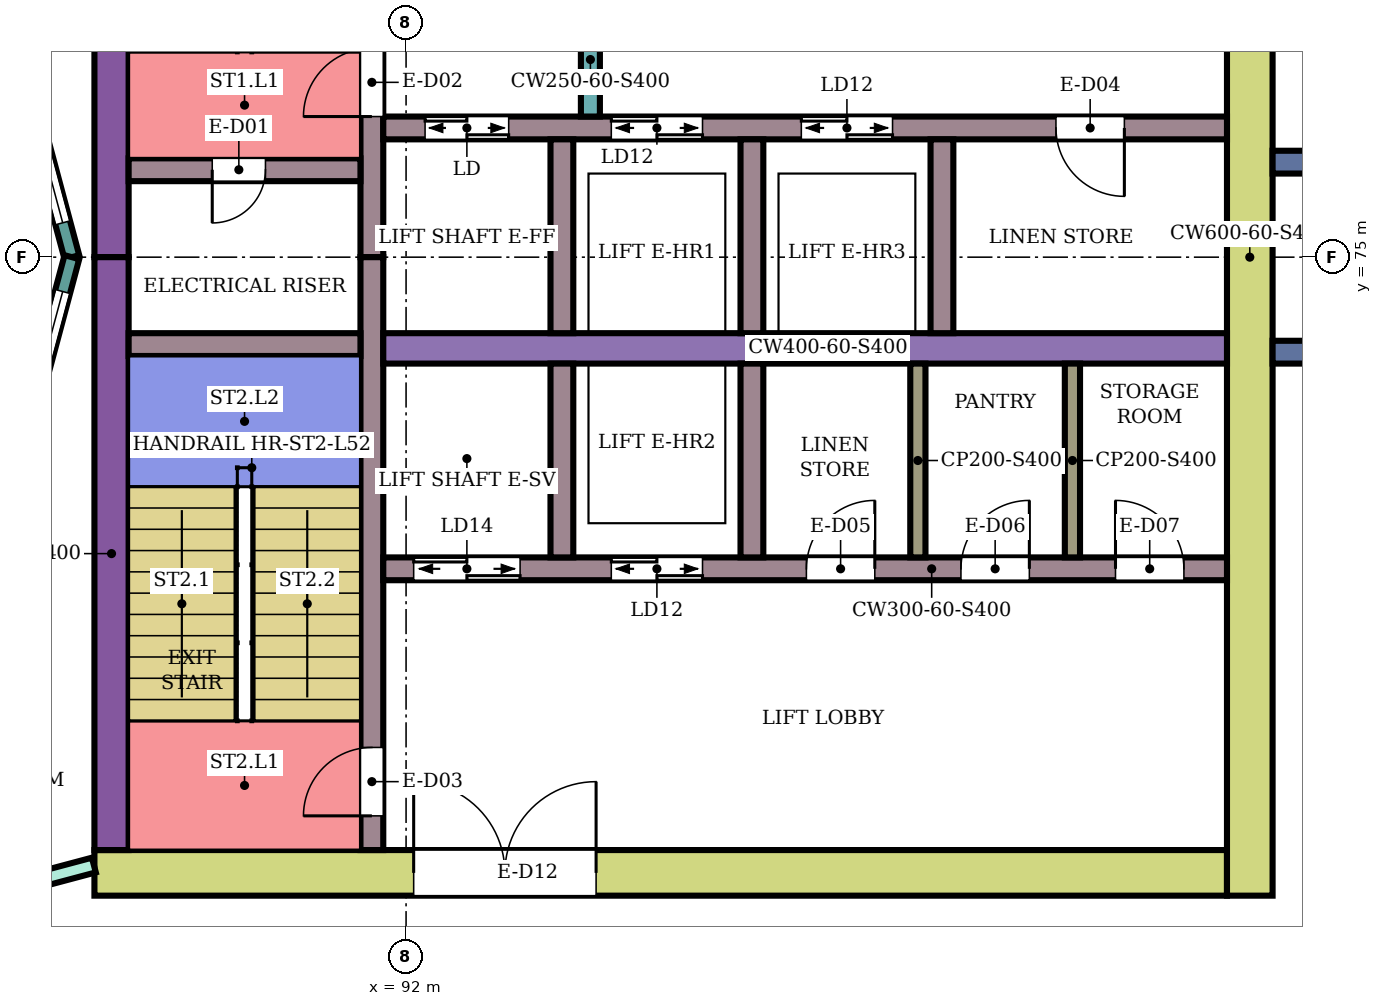
"""IFC4 building model, lengths in metres.
Left out: names, types, materials, properties, quantities, classifications, styles, units other than length and angle.
Written with IfcOpenShell. Run it as: python <this file> out.ifc"""

import sys

from ifc_helpers import new_model, si_unit, direction, frame, frame_2d, origin, place, context, subcontext, project, spatial, rectangle, extrude, element, fill, save


model = new_model("IFC4")
c1 = context("Model", 3, precision=1e-05, world=origin(), true_north=direction((0.0, 1.0)))
c2 = subcontext(c1, "Body", "Model", "MODEL_VIEW")
j1 = project(units=[si_unit("LENGTHUNIT", "METRE"), si_unit("PLANEANGLEUNIT", "RADIAN")], contexts=[c1])
p1 = place(None, origin())
s1 = spatial("IfcSite", under=j1, at=p1, CompositionType="ELEMENT")
p2 = place(p1, origin())
s2 = spatial("IfcBuilding", under=s1, at=p2, CompositionType="ELEMENT")
p3 = place(p2, frame((0.0, 0.0, 225.1)))
s3 = spatial("IfcBuildingStorey", under=s2, at=p3, CompositionType="ELEMENT", Elevation=225.1)
p4 = place(p3, frame((87.9, 66.9, 0.0), z_axis=(0.0, 0.0, 1.0), x_axis=(1.0, 0.0, 0.0)))
e1 = element("IfcWall", 1, at=p4, inside=s3, PredefinedType="SHEAR", context=c2, shape_type="SweptSolid", body=[
    extrude(rectangle(XDim=14.9, YDim=0.6, at=frame_2d((7.45, 0.0))), origin(), (0.0, 0.0, 1.0), 3.8),
])
p5 = place(p4, frame((4.2, 0.0, 0.0)))
e2 = element("IfcOpeningElement", 2, at=p5, cuts=e1, PredefinedType="OPENING", context=c2, shape_type="SweptSolid", body=[
    extrude(rectangle(XDim=2.4, YDim=2.4, at=frame_2d((1.2, 1.2))), frame((0.0, 0.31, 0.0), z_axis=(0.0, -1.0, 0.0), x_axis=(1.0, 0.0, 0.0)), (0.0, 0.0, 1.0), 0.62),
])
for number, where, z_axis, x_axis in (
    (3, (88.125, 75.0, 0.0), (0.0, 0.0, 1.0), (0.0, 1.0, 0.0)),
    (4, (88.125, 67.2, 0.0), (0.0, 0.0, 1.0), (0.0, 1.0, 0.0)),
):
    element("IfcWall", number, at=place(p3, frame(where, z_axis=z_axis, x_axis=x_axis)), inside=s3, PredefinedType="SHEAR", context=c2, shape_type="SweptSolid", body=[
        extrude(rectangle(XDim=7.8, YDim=0.45, at=frame_2d((3.9, 0.0))), origin(), (0.0, 0.0, 1.0), 3.8),
    ])
p6 = place(p3, frame((103.1, 66.6, 0.0), z_axis=(0.0, 0.0, 1.0), x_axis=(0.0, 1.0, 0.0)))
e5 = element("IfcWall", 5, at=p6, inside=s3, PredefinedType="SHEAR", context=c2, shape_type="SweptSolid", body=[
    extrude(rectangle(XDim=16.8, YDim=0.6, at=frame_2d((8.4, 0.0))), origin(), (0.0, 0.0, 1.0), 3.8),
])
p7 = place(p3, frame((91.55, 75.0, 0.0), z_axis=(0.0, 0.0, 1.0), x_axis=(0.0, 1.0, 0.0)))
e6 = element("IfcWall", 6, at=p7, inside=s3, PredefinedType="SHEAR", context=c2, shape_type="SweptSolid", body=[
    extrude(rectangle(XDim=7.8, YDim=0.3, at=frame_2d((3.9, 0.0))), origin(), (0.0, 0.0, 1.0), 3.8),
])
p8 = place(p7, frame((1.85, 0.0, 0.0)))
e7 = element("IfcOpeningElement", 7, at=p8, cuts=e6, PredefinedType="OPENING", context=c2, shape_type="SweptSolid", body=[
    extrude(rectangle(XDim=0.9, YDim=2.1, at=frame_2d((0.45, 1.05))), frame((0.0, 0.16, 0.0), z_axis=(0.0, -1.0, 0.0), x_axis=(1.0, 0.0, 0.0)), (0.0, 0.0, 1.0), 0.32),
])
p9 = place(p3, frame((91.55, 67.2, 0.0), z_axis=(0.0, 0.0, 1.0), x_axis=(0.0, 1.0, 0.0)))
e8 = element("IfcWall", 8, at=p9, inside=s3, PredefinedType="SHEAR", context=c2, shape_type="SweptSolid", body=[
    extrude(rectangle(XDim=7.8, YDim=0.3, at=frame_2d((3.9, 0.0))), origin(), (0.0, 0.0, 1.0), 3.8),
])
p10 = place(p9, frame((0.45, 0.0, 0.0)))
e9 = element("IfcOpeningElement", 9, at=p10, cuts=e8, PredefinedType="OPENING", context=c2, shape_type="SweptSolid", body=[
    extrude(rectangle(XDim=0.9, YDim=2.1, at=frame_2d((0.45, 1.05))), frame((0.0, 0.16, 0.0), z_axis=(0.0, -1.0, 0.0), x_axis=(1.0, 0.0, 0.0)), (0.0, 0.0, 1.0), 0.32),
])
p11 = place(p3, frame((88.35, 76.15, 0.0), z_axis=(0.0, 0.0, 1.0), x_axis=(1.0, 0.0, 0.0)))
e10 = element("IfcWall", 10, at=p11, inside=s3, PredefinedType="SHEAR", context=c2, shape_type="SweptSolid", body=[
    extrude(rectangle(XDim=3.05, YDim=0.3, at=frame_2d((1.525, 0.0))), origin(), (0.0, 0.0, 1.0), 3.8),
])
p12 = place(p11, frame((1.1, 0.0, 0.0)))
e11 = element("IfcOpeningElement", 11, at=p12, cuts=e10, PredefinedType="OPENING", context=c2, shape_type="SweptSolid", body=[
    extrude(rectangle(XDim=0.7, YDim=2.0, at=frame_2d((0.35, 1.0))), frame((0.0, 0.16, 0.0), z_axis=(0.0, -1.0, 0.0), x_axis=(1.0, 0.0, 0.0)), (0.0, 0.0, 1.0), 0.32),
])
p13 = place(p3, frame((88.35, 73.85, 0.0), z_axis=(0.0, 0.0, 1.0), x_axis=(1.0, 0.0, 0.0)))
e12 = element("IfcWall", 12, at=p13, inside=s3, PredefinedType="SHEAR", context=c2, shape_type="SweptSolid", body=[
    extrude(rectangle(XDim=3.05, YDim=0.3, at=frame_2d((1.525, 0.0))), origin(), (0.0, 0.0, 1.0), 3.8),
])
p14 = place(p3, frame((91.7, 76.7, 0.0), z_axis=(0.0, 0.0, 1.0), x_axis=(1.0, 0.0, 0.0)))
e13 = element("IfcWall", 13, at=p14, inside=s3, PredefinedType="SHEAR", context=c2, shape_type="SweptSolid", body=[
    extrude(rectangle(XDim=11.1, YDim=0.3, at=frame_2d((5.55, 0.0))), origin(), (0.0, 0.0, 1.0), 3.8),
])
p15 = place(p14, frame((0.55, 0.0, 0.0)))
e14 = element("IfcOpeningElement", 14, at=p15, cuts=e13, PredefinedType="OPENING", context=c2, shape_type="SweptSolid", body=[
    extrude(rectangle(XDim=1.1, YDim=2.1, at=frame_2d((0.55, 1.05))), frame((0.0, 0.16, 0.0), z_axis=(0.0, -1.0, 0.0), x_axis=(1.0, 0.0, 0.0)), (0.0, 0.0, 1.0), 0.32),
])
p16 = place(p14, frame((3.0, 0.0, 0.0)))
e15 = element("IfcOpeningElement", 15, at=p16, cuts=e13, PredefinedType="OPENING", context=c2, shape_type="SweptSolid", body=[
    extrude(rectangle(XDim=1.2, YDim=2.1, at=frame_2d((0.6, 1.05))), frame((0.0, 0.16, 0.0), z_axis=(0.0, -1.0, 0.0), x_axis=(1.0, 0.0, 0.0)), (0.0, 0.0, 1.0), 0.32),
])
p17 = place(p14, frame((5.5, 0.0, 0.0)))
e16 = element("IfcOpeningElement", 16, at=p17, cuts=e13, PredefinedType="OPENING", context=c2, shape_type="SweptSolid", body=[
    extrude(rectangle(XDim=1.2, YDim=2.1, at=frame_2d((0.6, 1.05))), frame((0.0, 0.16, 0.0), z_axis=(0.0, -1.0, 0.0), x_axis=(1.0, 0.0, 0.0)), (0.0, 0.0, 1.0), 0.32),
])
p18 = place(p14, frame((8.85, 0.0, 0.0)))
e17 = element("IfcOpeningElement", 17, at=p18, cuts=e13, PredefinedType="OPENING", context=c2, shape_type="SweptSolid", body=[
    extrude(rectangle(XDim=0.9, YDim=2.1, at=frame_2d((0.45, 1.05))), frame((0.0, 0.16, 0.0), z_axis=(0.0, -1.0, 0.0), x_axis=(1.0, 0.0, 0.0)), (0.0, 0.0, 1.0), 0.32),
])
p19 = place(p3, frame((91.7, 73.8, 0.0), z_axis=(0.0, 0.0, 1.0), x_axis=(1.0, 0.0, 0.0)))
e18 = element("IfcWall", 18, at=p19, inside=s3, PredefinedType="SHEAR", context=c2, shape_type="SweptSolid", body=[
    extrude(rectangle(XDim=11.1, YDim=0.4, at=frame_2d((5.55, 0.0))), origin(), (0.0, 0.0, 1.0), 3.8),
])
p20 = place(p3, frame((91.7, 70.9, 0.0), z_axis=(0.0, 0.0, 1.0), x_axis=(1.0, 0.0, 0.0)))
e19 = element("IfcWall", 19, at=p20, inside=s3, PredefinedType="SHEAR", context=c2, shape_type="SweptSolid", body=[
    extrude(rectangle(XDim=11.1, YDim=0.3, at=frame_2d((5.55, 0.0))), origin(), (0.0, 0.0, 1.0), 3.8),
])
p21 = place(p20, frame((0.4, 0.0, 0.0)))
e20 = element("IfcOpeningElement", 20, at=p21, cuts=e19, PredefinedType="OPENING", context=c2, shape_type="SweptSolid", body=[
    extrude(rectangle(XDim=1.4, YDim=2.1, at=frame_2d((0.7, 1.05))), frame((0.0, 0.16, 0.0), z_axis=(0.0, -1.0, 0.0), x_axis=(1.0, 0.0, 0.0)), (0.0, 0.0, 1.0), 0.32),
])
p22 = place(p20, frame((3.0, 0.0, 0.0)))
e21 = element("IfcOpeningElement", 21, at=p22, cuts=e19, PredefinedType="OPENING", context=c2, shape_type="SweptSolid", body=[
    extrude(rectangle(XDim=1.2, YDim=2.1, at=frame_2d((0.6, 1.05))), frame((0.0, 0.16, 0.0), z_axis=(0.0, -1.0, 0.0), x_axis=(1.0, 0.0, 0.0)), (0.0, 0.0, 1.0), 0.32),
])
p23 = place(p20, frame((5.567, 0.0, 0.0)))
e22 = element("IfcOpeningElement", 22, at=p23, cuts=e19, PredefinedType="OPENING", context=c2, shape_type="SweptSolid", body=[
    extrude(rectangle(XDim=0.9, YDim=2.1, at=frame_2d((0.45, 1.05))), frame((0.0, 0.16, 0.0), z_axis=(0.0, -1.0, 0.0), x_axis=(1.0, 0.0, 0.0)), (0.0, 0.0, 1.0), 0.32),
])
p24 = place(p20, frame((7.6, 0.0, 0.0)))
e23 = element("IfcOpeningElement", 23, at=p24, cuts=e19, PredefinedType="OPENING", context=c2, shape_type="SweptSolid", body=[
    extrude(rectangle(XDim=0.9, YDim=2.1, at=frame_2d((0.45, 1.05))), frame((0.0, 0.16, 0.0), z_axis=(0.0, -1.0, 0.0), x_axis=(1.0, 0.0, 0.0)), (0.0, 0.0, 1.0), 0.32),
])
p25 = place(p20, frame((9.633, 0.0, 0.0)))
e24 = element("IfcOpeningElement", 24, at=p25, cuts=e19, PredefinedType="OPENING", context=c2, shape_type="SweptSolid", body=[
    extrude(rectangle(XDim=0.9, YDim=2.1, at=frame_2d((0.45, 1.05))), frame((0.0, 0.16, 0.0), z_axis=(0.0, -1.0, 0.0), x_axis=(1.0, 0.0, 0.0)), (0.0, 0.0, 1.0), 0.32),
])
for number, where, z_axis, x_axis in (
    (25, (94.05, 74.0, 0.0), (0.0, 0.0, 1.0), (0.0, 1.0, 0.0)),
    (26, (96.55, 74.0, 0.0), (0.0, 0.0, 1.0), (0.0, 1.0, 0.0)),
    (27, (99.05, 74.0, 0.0), (0.0, 0.0, 1.0), (0.0, 1.0, 0.0)),
    (28, (94.05, 71.05, 0.0), (0.0, 0.0, 1.0), (0.0, 1.0, 0.0)),
    (29, (96.55, 71.05, 0.0), (0.0, 0.0, 1.0), (0.0, 1.0, 0.0)),
):
    element("IfcWall", number, at=place(p3, frame(where, z_axis=z_axis, x_axis=x_axis)), inside=s3, PredefinedType="SHEAR", context=c2, shape_type="SweptSolid", body=[
        extrude(rectangle(XDim=2.55, YDim=0.3, at=frame_2d((1.275, 0.0))), origin(), (0.0, 0.0, 1.0), 3.8),
    ])
p26 = place(p3, frame((94.425, 76.85, 0.0), z_axis=(0.0, 0.0, 1.0), x_axis=(0.0, 1.0, 0.0)))
e30 = element("IfcWall", 30, at=p26, inside=s3, PredefinedType="SHEAR", context=c2, shape_type="SweptSolid", body=[
    extrude(rectangle(XDim=1.5, YDim=0.25, at=frame_2d((0.75, 0.0))), origin(), (0.0, 0.0, 1.0), 3.8),
])
for number, where, z_axis, x_axis in (
    (31, (103.4, 73.75, 0.0), (0.0, 0.0, 1.0), (1.0, 0.0, 0.0)),
    (32, (103.4, 76.25, 0.0), (0.0, 0.0, 1.0), (1.0, 0.0, 0.0)),
):
    element("IfcWall", number, at=place(p3, frame(where, z_axis=z_axis, x_axis=x_axis)), inside=s3, PredefinedType="NOTDEFINED", context=c2, shape_type="SweptSolid", body=[
        extrude(rectangle(XDim=2.416, YDim=0.3, at=frame_2d((1.208, 0.0))), origin(), (0.0, 0.0, 1.0), 4.2),
    ])
p27 = place(p3, frame((87.604, 75.0, 0.0), z_axis=(0.0, 0.0, 1.0), x_axis=(-0.258789828301, 0.965933654434, 0.0)))
e33 = element("IfcWall", 33, at=p27, inside=s3, PredefinedType="NOTDEFINED", context=c2, shape_type="SweptSolid", body=[
    extrude(rectangle(XDim=3.936, YDim=0.2, at=frame_2d((1.968, 0.0))), origin(), (0.0, 0.0, 1.0), 4.2),
])
p28 = place(p27, frame((0.468, 0.0, 0.9)))
e34 = element("IfcOpeningElement", 34, at=p28, cuts=e33, PredefinedType="OPENING", context=c2, shape_type="SweptSolid", body=[
    extrude(rectangle(XDim=3.0, YDim=2.3, at=frame_2d((1.5, 1.15))), frame((0.0, 0.11, 0.0), z_axis=(0.0, -1.0, 0.0), x_axis=(1.0, 0.0, 0.0)), (0.0, 0.0, 1.0), 0.22),
])
p29 = place(p3, frame((86.585, 71.198, 0.0), z_axis=(0.0, 0.0, 1.0), x_axis=(0.258789828301, 0.965933654434, 0.0)))
e35 = element("IfcWall", 35, at=p29, inside=s3, PredefinedType="NOTDEFINED", context=c2, shape_type="SweptSolid", body=[
    extrude(rectangle(XDim=3.936, YDim=0.2, at=frame_2d((1.968, 0.0))), origin(), (0.0, 0.0, 1.0), 4.2),
])
p30 = place(p29, frame((0.468, 0.0, 0.9)))
e36 = element("IfcOpeningElement", 36, at=p30, cuts=e35, PredefinedType="OPENING", context=c2, shape_type="SweptSolid", body=[
    extrude(rectangle(XDim=3.0, YDim=2.3, at=frame_2d((1.5, 1.15))), frame((0.0, 0.11, 0.0), z_axis=(0.0, -1.0, 0.0), x_axis=(1.0, 0.0, 0.0)), (0.0, 0.0, 1.0), 0.22),
])
p31 = place(p3, frame((80.125, 64.932, 0.0), z_axis=(0.0, 0.0, 1.0), x_axis=(0.966236955806, 0.257655089674, 0.0)))
e37 = element("IfcWall", 37, at=p31, inside=s3, PredefinedType="PARTITIONING", context=c2, shape_type="SweptSolid", body=[
    extrude(rectangle(XDim=8.039, YDim=0.2, at=frame_2d((4.02, 0.0))), origin(), (0.0, 0.0, 1.0), 3.75),
])
p32 = place(p31, frame((6.298, 0.0, 0.0)))
e38 = element("IfcOpeningElement", 38, at=p32, cuts=e37, PredefinedType="OPENING", context=c2, shape_type="SweptSolid", body=[
    extrude(rectangle(XDim=0.9, YDim=2.1, at=frame_2d((0.45, 1.05))), frame((0.0, 0.11, 0.0), z_axis=(0.0, -1.0, 0.0), x_axis=(1.0, 0.0, 0.0)), (0.0, 0.0, 1.0), 0.22),
])
p33 = place(p31, frame((2.045, 0.0, 0.0)))
e39 = element("IfcOpeningElement", 39, at=p33, cuts=e37, PredefinedType="OPENING", context=c2, shape_type="SweptSolid", body=[
    extrude(rectangle(XDim=0.9, YDim=2.1, at=frame_2d((0.45, 1.05))), frame((0.0, 0.11, 0.0), z_axis=(0.0, -1.0, 0.0), x_axis=(1.0, 0.0, 0.0)), (0.0, 0.0, 1.0), 0.22),
])
for number, where, z_axis, x_axis in (
    (40, (98.733, 71.05, 0.0), (0.0, 0.0, 1.0), (0.0, 1.0, 0.0)),
    (41, (100.767, 71.05, 0.0), (0.0, 0.0, 1.0), (0.0, 1.0, 0.0)),
):
    element("IfcWall", number, at=place(p3, frame(where, z_axis=z_axis, x_axis=x_axis)), inside=s3, PredefinedType="PARTITIONING", context=c2, shape_type="SweptSolid", body=[
        extrude(rectangle(XDim=2.55, YDim=0.2, at=frame_2d((1.275, 0.0))), origin(), (0.0, 0.0, 1.0), 3.8),
    ])
p34 = place(p28, origin())
e42 = element("IfcWindow", 42, at=p34, inside=s3, PartitioningType="SINGLE_PANEL", PredefinedType="WINDOW", context=c2, shape_type="SweptSolid", body=[
    extrude(rectangle(XDim=3.0, YDim=2.3, at=frame_2d((1.5, 1.15))), frame((0.0, 0.03, 0.0), z_axis=(0.0, -1.0, 0.0), x_axis=(1.0, 0.0, 0.0)), (0.0, 0.0, 1.0), 0.06),
])
fill(e34, e42)
p35 = place(p30, origin())
e43 = element("IfcWindow", 43, at=p35, inside=s3, PartitioningType="SINGLE_PANEL", PredefinedType="WINDOW", context=c2, shape_type="SweptSolid", body=[
    extrude(rectangle(XDim=3.0, YDim=2.3, at=frame_2d((1.5, 1.15))), frame((0.0, 0.03, 0.0), z_axis=(0.0, -1.0, 0.0), x_axis=(1.0, 0.0, 0.0)), (0.0, 0.0, 1.0), 0.06),
])
fill(e36, e43)
p36 = place(p12, frame((0.7, 0.0, 0.0), z_axis=(0.0, 0.0, 1.0), x_axis=(-1.0, 0.0, 0.0)))
e44 = element("IfcDoor", 44, at=p36, inside=s3, OperationType="SINGLE_SWING_RIGHT", PredefinedType="DOOR", context=c2, shape_type="SweptSolid", body=[
    extrude(rectangle(XDim=0.7, YDim=2.0, at=frame_2d((0.35, 1.0))), frame((0.0, 0.025, 0.0), z_axis=(0.0, -1.0, 0.0), x_axis=(1.0, 0.0, 0.0)), (0.0, 0.0, 1.0), 0.05),
])
fill(e11, e44)
p37 = place(p8, origin())
e45 = element("IfcDoor", 45, at=p37, inside=s3, OperationType="SINGLE_SWING_LEFT", PredefinedType="DOOR", context=c2, shape_type="SweptSolid", body=[
    extrude(rectangle(XDim=0.9, YDim=2.1, at=frame_2d((0.45, 1.05))), frame((0.0, 0.025, 0.0), z_axis=(0.0, -1.0, 0.0), x_axis=(1.0, 0.0, 0.0)), (0.0, 0.0, 1.0), 0.05),
])
fill(e7, e45)
p38 = place(p10, origin())
e46 = element("IfcDoor", 46, at=p38, inside=s3, OperationType="SINGLE_SWING_LEFT", PredefinedType="DOOR", context=c2, shape_type="SweptSolid", body=[
    extrude(rectangle(XDim=0.9, YDim=2.1, at=frame_2d((0.45, 1.05))), frame((0.0, 0.025, 0.0), z_axis=(0.0, -1.0, 0.0), x_axis=(1.0, 0.0, 0.0)), (0.0, 0.0, 1.0), 0.05),
])
fill(e9, e46)
p39 = place(p15, origin())
e47 = element("IfcDoor", 47, at=p39, inside=s3, OperationType="DOUBLE_DOOR_SLIDING", PredefinedType="DOOR", context=c2, shape_type="SweptSolid", body=[
    extrude(rectangle(XDim=1.1, YDim=2.1, at=frame_2d((0.55, 1.05))), frame((0.0, 0.025, 0.0), z_axis=(0.0, -1.0, 0.0), x_axis=(1.0, 0.0, 0.0)), (0.0, 0.0, 1.0), 0.05),
])
fill(e14, e47)
p40 = place(p16, origin())
e48 = element("IfcDoor", 48, at=p40, inside=s3, OperationType="DOUBLE_DOOR_SLIDING", PredefinedType="DOOR", context=c2, shape_type="SweptSolid", body=[
    extrude(rectangle(XDim=1.2, YDim=2.1, at=frame_2d((0.6, 1.05))), frame((0.0, 0.025, 0.0), z_axis=(0.0, -1.0, 0.0), x_axis=(1.0, 0.0, 0.0)), (0.0, 0.0, 1.0), 0.05),
])
fill(e15, e48)
p41 = place(p17, origin())
e49 = element("IfcDoor", 49, at=p41, inside=s3, OperationType="DOUBLE_DOOR_SLIDING", PredefinedType="DOOR", context=c2, shape_type="SweptSolid", body=[
    extrude(rectangle(XDim=1.2, YDim=2.1, at=frame_2d((0.6, 1.05))), frame((0.0, 0.025, 0.0), z_axis=(0.0, -1.0, 0.0), x_axis=(1.0, 0.0, 0.0)), (0.0, 0.0, 1.0), 0.05),
])
fill(e16, e49)
p42 = place(p18, frame((0.9, 0.0, 0.0), z_axis=(0.0, 0.0, 1.0), x_axis=(-1.0, 0.0, 0.0)))
e50 = element("IfcDoor", 50, at=p42, inside=s3, OperationType="SINGLE_SWING_LEFT", PredefinedType="DOOR", context=c2, shape_type="SweptSolid", body=[
    extrude(rectangle(XDim=0.9, YDim=2.1, at=frame_2d((0.45, 1.05))), frame((0.0, 0.025, 0.0), z_axis=(0.0, -1.0, 0.0), x_axis=(1.0, 0.0, 0.0)), (0.0, 0.0, 1.0), 0.05),
])
fill(e17, e50)
p43 = place(p21, origin())
e51 = element("IfcDoor", 51, at=p43, inside=s3, OperationType="DOUBLE_DOOR_SLIDING", PredefinedType="DOOR", context=c2, shape_type="SweptSolid", body=[
    extrude(rectangle(XDim=1.4, YDim=2.1, at=frame_2d((0.7, 1.05))), frame((0.0, 0.025, 0.0), z_axis=(0.0, -1.0, 0.0), x_axis=(1.0, 0.0, 0.0)), (0.0, 0.0, 1.0), 0.05),
])
fill(e20, e51)
p44 = place(p22, origin())
e52 = element("IfcDoor", 52, at=p44, inside=s3, OperationType="DOUBLE_DOOR_SLIDING", PredefinedType="DOOR", context=c2, shape_type="SweptSolid", body=[
    extrude(rectangle(XDim=1.2, YDim=2.1, at=frame_2d((0.6, 1.05))), frame((0.0, 0.025, 0.0), z_axis=(0.0, -1.0, 0.0), x_axis=(1.0, 0.0, 0.0)), (0.0, 0.0, 1.0), 0.05),
])
fill(e21, e52)
p45 = place(p23, origin())
e53 = element("IfcDoor", 53, at=p45, inside=s3, OperationType="SINGLE_SWING_RIGHT", PredefinedType="DOOR", context=c2, shape_type="SweptSolid", body=[
    extrude(rectangle(XDim=0.9, YDim=2.1, at=frame_2d((0.45, 1.05))), frame((0.0, 0.025, 0.0), z_axis=(0.0, -1.0, 0.0), x_axis=(1.0, 0.0, 0.0)), (0.0, 0.0, 1.0), 0.05),
])
fill(e22, e53)
p46 = place(p24, origin())
e54 = element("IfcDoor", 54, at=p46, inside=s3, OperationType="SINGLE_SWING_RIGHT", PredefinedType="DOOR", context=c2, shape_type="SweptSolid", body=[
    extrude(rectangle(XDim=0.9, YDim=2.1, at=frame_2d((0.45, 1.05))), frame((0.0, 0.025, 0.0), z_axis=(0.0, -1.0, 0.0), x_axis=(1.0, 0.0, 0.0)), (0.0, 0.0, 1.0), 0.05),
])
fill(e23, e54)
p47 = place(p25, origin())
e55 = element("IfcDoor", 55, at=p47, inside=s3, OperationType="SINGLE_SWING_LEFT", PredefinedType="DOOR", context=c2, shape_type="SweptSolid", body=[
    extrude(rectangle(XDim=0.9, YDim=2.1, at=frame_2d((0.45, 1.05))), frame((0.0, 0.025, 0.0), z_axis=(0.0, -1.0, 0.0), x_axis=(1.0, 0.0, 0.0)), (0.0, 0.0, 1.0), 0.05),
])
fill(e24, e55)
p48 = place(p5, origin())
e56 = element("IfcDoor", 56, at=p48, inside=s3, OperationType="DOUBLE_DOOR_SINGLE_SWING", PredefinedType="DOOR", context=c2, shape_type="SweptSolid", body=[
    extrude(rectangle(XDim=2.4, YDim=2.4, at=frame_2d((1.2, 1.2))), frame((0.0, 0.025, 0.0), z_axis=(0.0, -1.0, 0.0), x_axis=(1.0, 0.0, 0.0)), (0.0, 0.0, 1.0), 0.05),
])
fill(e2, e56)
save(model, sys.argv[1])
